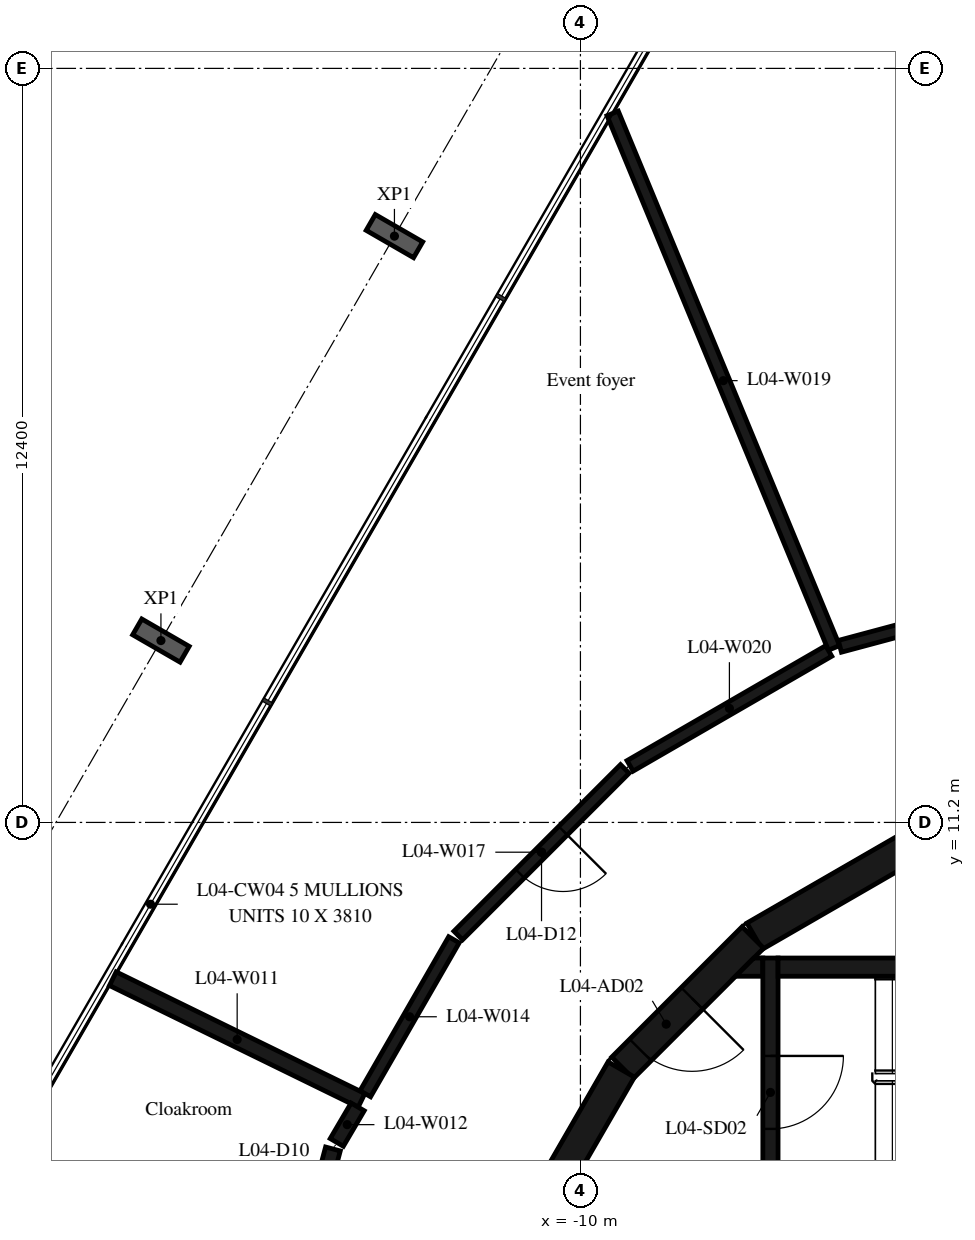
"""IFC4 building model, lengths in metres.
Left out: names, types, materials, properties, quantities, classifications, styles, units other than length and angle.
Written with IfcOpenShell. Run it as: python <this file> out.ifc"""

import sys

from ifc_helpers import new_model, si_unit, direction, frame, frame_2d, origin, origin_2d, place, context, subcontext, project, spatial, polyline, rectangle, i_section, outline, extrude, element, fill, save


model = new_model("IFC4")
c1 = context("Model", 3, precision=1e-05, world=origin(), true_north=direction((0.0, 1.0)))
c2 = subcontext(c1, "Body", "Model", "MODEL_VIEW")
j1 = project(units=[si_unit("LENGTHUNIT", "METRE"), si_unit("PLANEANGLEUNIT", "RADIAN")], contexts=[c1])
p1 = place(None, origin())
s1 = spatial("IfcSite", under=j1, at=p1, CompositionType="ELEMENT")
p2 = place(p1, origin())
s2 = spatial("IfcBuilding", under=s1, at=p2, CompositionType="ELEMENT")
p3 = place(p2, frame((0.0, 0.0, 23.4)))
s3 = spatial("IfcBuildingStorey", under=s2, at=p3, CompositionType="ELEMENT", Elevation=23.4)
for number, where, z_axis, x_axis in (
    (1, (-13.059, 20.842, -0.38), (0.0, 0.0, 1.0), (0.5, 0.866, 0.0)),
    (2, (-16.899, 14.19, -0.38), (0.0, 0.0, 1.0), (0.5, 0.866, 0.0)),
):
    element("IfcColumn", number, at=place(p3, frame(where, z_axis=z_axis, x_axis=x_axis)), inside=s3, PredefinedType="COLUMN", context=c2, shape_type="SweptSolid", body=[
        extrude(i_section(OverallWidth=0.3, OverallDepth=0.9, WebThickness=0.019, FlangeThickness=0.035, FilletRadius=0.03, at=origin_2d()), origin(), (0.0, 0.0, 1.0), 4.8),
    ])
p4 = place(p3, frame((-4.51, 10.845, 0.0), z_axis=(0.0, 0.0, 1.0), x_axis=(-0.865975092491, -0.500087131594, 0.0)))
e3 = element("IfcWall", 3, at=p4, inside=s3, PredefinedType="SHEAR", context=c2, shape_type="SweptSolid", body=[
    extrude(rectangle(XDim=3.033, YDim=0.5, at=frame_2d((1.516, 0.0))), origin(), (0.0, 0.0, 1.0), 4.42),
])
p5 = place(p3, frame((-7.164, 9.308, 0.0), z_axis=(0.0, 0.0, 1.0), x_axis=(-0.707106781187, -0.707106781187, 0.0)))
e4 = element("IfcWall", 4, at=p5, inside=s3, PredefinedType="SHEAR", context=c2, shape_type="SweptSolid", body=[
    extrude(rectangle(XDim=3.032, YDim=0.5, at=frame_2d((1.516, 0.0))), origin(), (0.0, 0.0, 1.0), 4.42),
])
p6 = place(p5, frame((1.416, 0.0, 0.0)))
e5 = element("IfcOpeningElement", 5, at=p6, cuts=e4, PredefinedType="OPENING", context=c2, shape_type="SweptSolid", body=[
    extrude(rectangle(XDim=1.2, YDim=2.1, at=frame_2d((0.6, 1.05))), frame((0.0, 0.26, 0.0), z_axis=(0.0, -1.0, 0.0), x_axis=(1.0, 0.0, 0.0)), (0.0, 0.0, 1.0), 0.52),
])
p7 = place(p3, frame((-9.329, 7.137, 0.0), z_axis=(0.0, 0.0, 1.0), x_axis=(-0.500087131594, -0.865975092491, 0.0)))
e6 = element("IfcWall", 6, at=p7, inside=s3, PredefinedType="SHEAR", context=c2, shape_type="SweptSolid", body=[
    extrude(rectangle(XDim=3.033, YDim=0.5, at=frame_2d((1.516, 0.0))), origin(), (0.0, 0.0, 1.0), 4.42),
])
p8 = place(p3, frame((-6.75, 8.82, 0.0), z_axis=(0.0, 0.0, 1.0), x_axis=(1.0, 0.0, 0.0)))
e7 = element("IfcWall", 7, at=p8, inside=s3, PredefinedType="SHEAR", context=c2, shape_type="SweptSolid", body=[
    extrude(rectangle(XDim=6.75, YDim=0.3, at=frame_2d((3.375, 0.0))), origin(), (0.0, 0.0, 1.0), 4.42),
])
p9 = place(p3, frame((-6.875, 8.97, 0.0), z_axis=(0.0, 0.0, 1.0), x_axis=(0.0, -1.0, 0.0)))
e8 = element("IfcWall", 8, at=p9, inside=s3, PredefinedType="SHEAR", context=c2, shape_type="SweptSolid", body=[
    extrude(rectangle(XDim=3.92, YDim=0.25, at=frame_2d((1.96, 0.0))), origin(), (0.0, 0.0, 1.0), 4.42),
])
p10 = place(p9, frame((1.61, 0.0, 0.0)))
e9 = element("IfcOpeningElement", 9, at=p10, cuts=e8, PredefinedType="OPENING", context=c2, shape_type="SweptSolid", body=[
    extrude(rectangle(XDim=1.2, YDim=2.1, at=frame_2d((0.6, 1.05))), frame((0.0, 0.135, 0.0), z_axis=(0.0, -1.0, 0.0), x_axis=(1.0, 0.0, 0.0)), (0.0, 0.0, 1.0), 0.27),
])
p11 = place(p3, origin())
e10 = element("IfcWall", 10, at=p11, inside=s3, PredefinedType="SHEAR", context=c2, shape_type="SweptSolid", body=[
    extrude(outline(polyline([(-7.148, 8.97), (-7.0, 8.97), (-7.0, 8.67), (-7.448, 8.67), (-7.148, 8.97)])), origin(), (0.0, 0.0, 1.0), 4.42),
])
p12 = place(p3, frame((-14.07, 5.83, 0.0), z_axis=(0.0, 0.0, 1.0), x_axis=(-0.25709213915, -0.9663868956, 0.0)))
e11 = element("IfcWall", 11, at=p12, inside=s3, PredefinedType="PARTITIONING", context=c2, shape_type="SweptSolid", body=[
    extrude(rectangle(XDim=2.131, YDim=0.25, at=frame_2d((1.065, 0.0))), origin(), (0.0, 0.0, 1.0), 4.42),
])
p13 = place(p12, frame((0.565, 0.0, 0.0)))
e12 = element("IfcOpeningElement", 12, at=p13, cuts=e11, PredefinedType="OPENING", context=c2, shape_type="SweptSolid", body=[
    extrude(rectangle(XDim=1.0, YDim=2.1, at=frame_2d((0.5, 1.05))), frame((0.0, 0.135, 0.0), z_axis=(0.0, -1.0, 0.0), x_axis=(1.0, 0.0, 0.0)), (0.0, 0.0, 1.0), 0.27),
])
p14 = place(p3, frame((-13.6, 6.63, 0.0), z_axis=(0.0, 0.0, 1.0), x_axis=(-0.898339215614, 0.43930246265, 0.0)))
e13 = element("IfcWall", 13, at=p14, inside=s3, PredefinedType="PARTITIONING", context=c2, shape_type="SweptSolid", body=[
    extrude(rectangle(XDim=4.553, YDim=0.25, at=frame_2d((2.276, 0.0))), origin(), (0.0, 0.0, 1.0), 4.42),
])
p15 = place(p3, frame((-13.663, 6.522, 0.0), z_axis=(0.0, 0.0, 1.0), x_axis=(-0.506421854576, -0.862285860494, 0.0)))
e14 = element("IfcWall", 14, at=p15, inside=s3, PredefinedType="PARTITIONING", context=c2, shape_type="SweptSolid", body=[
    extrude(rectangle(XDim=0.678, YDim=0.25, at=frame_2d((0.339, 0.0))), origin(), (0.0, 0.0, 1.0), 4.42),
])
p16 = place(p3, frame((-12.08, 9.27, 0.0), z_axis=(0.0, 0.0, 1.0), x_axis=(-0.498926404598, -0.866644357736, 0.0)))
e15 = element("IfcWall", 15, at=p16, inside=s3, PredefinedType="PARTITIONING", context=c2, shape_type="SweptSolid", body=[
    extrude(rectangle(XDim=2.921, YDim=0.2, at=frame_2d((1.461, 0.0))), origin(), (0.0, 0.0, 1.0), 4.42),
])
p17 = place(p3, frame((-9.27, 12.08, 0.0), z_axis=(0.0, 0.0, 1.0), x_axis=(-0.707106781187, -0.707106781187, 0.0)))
e16 = element("IfcWall", 16, at=p17, inside=s3, PredefinedType="PARTITIONING", context=c2, shape_type="SweptSolid", body=[
    extrude(rectangle(XDim=3.874, YDim=0.2, at=frame_2d((1.937, 0.0))), origin(), (0.0, 0.0, 1.0), 4.42),
])
p18 = place(p17, frame((1.437, 0.0, 0.0)))
e17 = element("IfcOpeningElement", 17, at=p18, cuts=e16, PredefinedType="OPENING", context=c2, shape_type="SweptSolid", body=[
    extrude(rectangle(XDim=1.0, YDim=2.1, at=frame_2d((0.5, 1.05))), frame((0.0, 0.11, 0.0), z_axis=(0.0, -1.0, 0.0), x_axis=(1.0, 0.0, 0.0)), (0.0, 0.0, 1.0), 0.22),
])
p19 = place(p3, frame((-5.83, 14.07, 0.0), z_axis=(0.0, 0.0, 1.0), x_axis=(-0.382588257379, 0.923918949538, 0.0)))
e18 = element("IfcWall", 18, at=p19, inside=s3, PredefinedType="PARTITIONING", context=c2, shape_type="SweptSolid", body=[
    extrude(rectangle(XDim=9.514, YDim=0.2, at=frame_2d((4.757, 0.0))), origin(), (0.0, 0.0, 1.0), 4.42),
])
p20 = place(p3, frame((-5.917, 14.02, 0.0), z_axis=(0.0, 0.0, 1.0), x_axis=(-0.865591582237, -0.500750649286, 0.0)))
e19 = element("IfcWall", 19, at=p20, inside=s3, PredefinedType="PARTITIONING", context=c2, shape_type="SweptSolid", body=[
    extrude(rectangle(XDim=3.774, YDim=0.2, at=frame_2d((1.887, 0.0))), origin(), (0.0, 0.0, 1.0), 4.42),
])
p21 = place(p3, frame((-1.99, 15.1, 0.0), z_axis=(0.0, 0.0, 1.0), x_axis=(-0.96585437197, -0.259085569159, 0.0)))
e20 = element("IfcWall", 20, at=p21, inside=s3, PredefinedType="PARTITIONING", context=c2, shape_type="SweptSolid", body=[
    extrude(rectangle(XDim=3.876, YDim=0.2, at=frame_2d((1.938, 0.0))), origin(), (0.0, 0.0, 1.0), 4.42),
])
p22 = place(p10, origin())
e21 = element("IfcDoor", 21, at=p22, inside=s3, OperationType="SINGLE_SWING_LEFT", PredefinedType="DOOR", context=c2, shape_type="SweptSolid", body=[
    extrude(rectangle(XDim=1.2, YDim=2.1, at=frame_2d((0.6, 1.05))), frame((0.0, 0.025, 0.0), z_axis=(0.0, -1.0, 0.0), x_axis=(1.0, 0.0, 0.0)), (0.0, 0.0, 1.0), 0.05),
])
fill(e9, e21)
p23 = place(p6, origin())
e22 = element("IfcDoor", 22, at=p23, inside=s3, OperationType="SINGLE_SWING_RIGHT", PredefinedType="DOOR", context=c2, shape_type="SweptSolid", body=[
    extrude(rectangle(XDim=1.2, YDim=2.1, at=frame_2d((0.6, 1.05))), frame((0.0, 0.025, 0.0), z_axis=(0.0, -1.0, 0.0), x_axis=(1.0, 0.0, 0.0)), (0.0, 0.0, 1.0), 0.05),
])
fill(e5, e22)
p24 = place(p18, origin())
e23 = element("IfcDoor", 23, at=p24, inside=s3, OperationType="SINGLE_SWING_LEFT", PredefinedType="DOOR", context=c2, shape_type="SweptSolid", body=[
    extrude(rectangle(XDim=1.0, YDim=2.1, at=frame_2d((0.5, 1.05))), frame((0.0, 0.025, 0.0), z_axis=(0.0, -1.0, 0.0), x_axis=(1.0, 0.0, 0.0)), (0.0, 0.0, 1.0), 0.05),
])
fill(e17, e23)
save(model, sys.argv[1])
